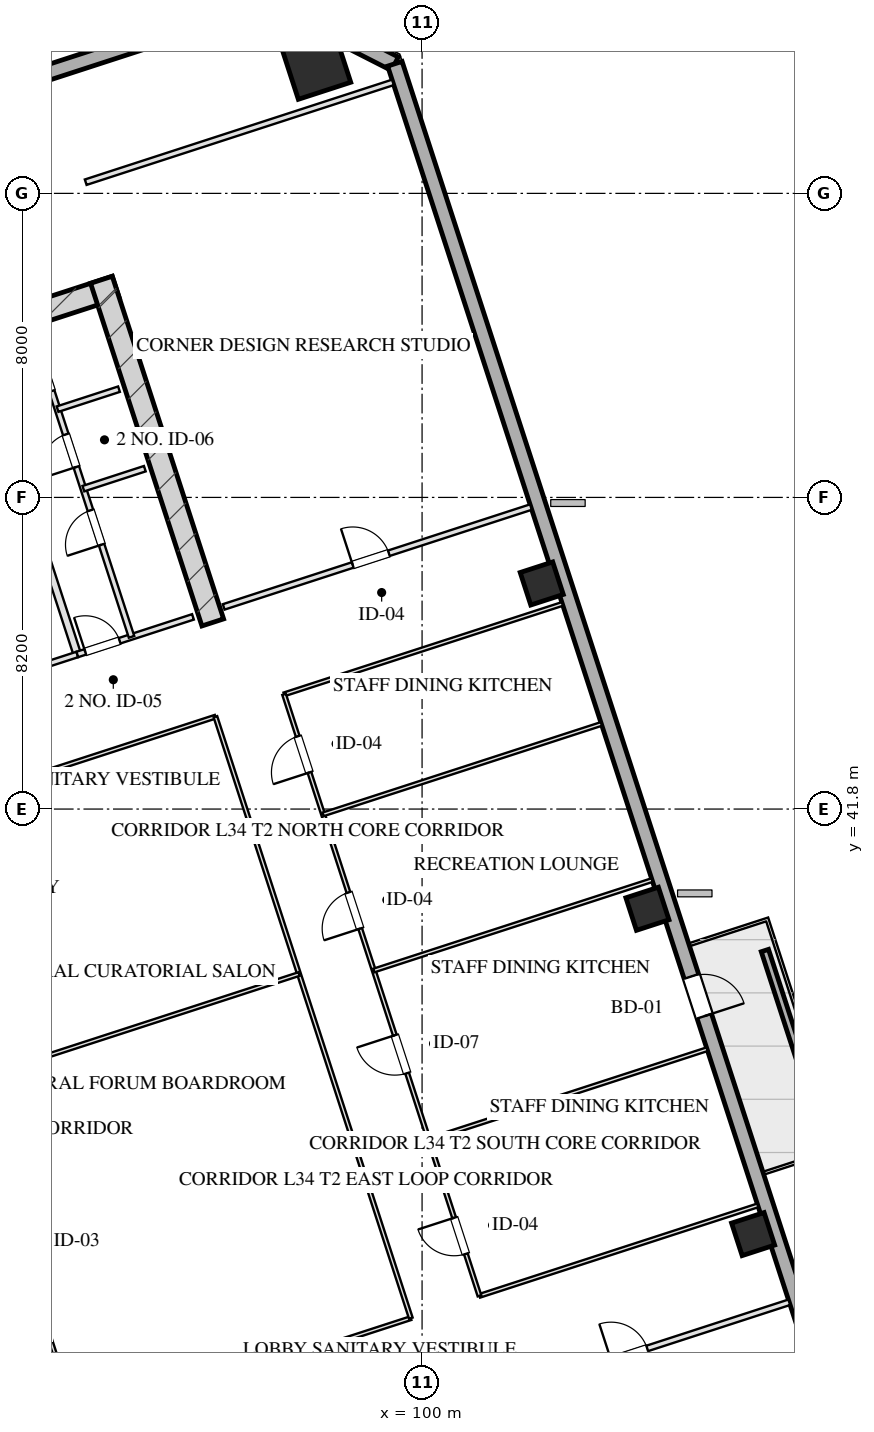
"""IFC4 building model, lengths in metres.
Left out: names, types, materials, properties, quantities, classifications, styles, units other than length and angle.
Written with IfcOpenShell. Run it as: python <this file> out.ifc"""

import sys

from ifc_helpers import new_model, si_unit, direction, frame, frame_2d, origin, origin_2d, place, context, subcontext, project, spatial, rectangle, hollow_rectangle, extrude, element, fill, save


model = new_model("IFC4")
c1 = context("Model", 3, precision=1e-05, world=origin(), true_north=direction((0.0, 1.0)))
c2 = subcontext(c1, "Body", "Model", "MODEL_VIEW")
j1 = project(units=[si_unit("LENGTHUNIT", "METRE"), si_unit("PLANEANGLEUNIT", "RADIAN")], contexts=[c1])
p1 = place(None, origin())
s1 = spatial("IfcSite", under=j1, at=p1, CompositionType="ELEMENT")
p2 = place(p1, origin())
s2 = spatial("IfcBuilding", under=s1, at=p2, CompositionType="ELEMENT")
p3 = place(p2, frame((0.0, 0.0, 131.1)))
s3 = spatial("IfcBuildingStorey", under=s2, at=p3, CompositionType="ELEMENT", Elevation=131.1)
p4 = place(p3, frame((76.344, 50.466, 0.0), z_axis=(0.0, 0.0, 1.0), x_axis=(0.951055727519, 0.309019421968, 0.0)))
e1 = element("IfcWall", 1, at=p4, inside=s3, PredefinedType="SHEAR", context=c2, shape_type="SweptSolid", body=[
    extrude(rectangle(XDim=16.4, YDim=0.6, at=frame_2d((8.2, 0.0))), origin(), (0.0, 0.0, 1.0), 3.45),
])
p5 = place(p3, frame((94.492, 46.71, 0.0), z_axis=(0.0, 0.0, 1.0), x_axis=(-0.309010370028, 0.95105866865, 0.0)))
e2 = element("IfcWall", 2, at=p5, inside=s3, PredefinedType="SHEAR", context=c2, shape_type="SweptSolid", body=[
    extrude(rectangle(XDim=9.48, YDim=0.6, at=frame_2d((4.74, 0.0))), origin(), (0.0, 0.0, 1.0), 3.45),
])
p6 = place(p3, frame((97.209, 61.388, 0.0), z_axis=(0.0, 0.0, 1.0), x_axis=(0.951056516295, 0.309016994375, 0.0)))
e3 = element("IfcColumn", 3, at=p6, inside=s3, PredefinedType="COLUMN", context=c2, shape_type="SweptSolid", body=[
    extrude(hollow_rectangle(XDim=1.45, YDim=1.45, WallThickness=0.05, at=origin_2d()), origin(), (0.0, 0.0, 1.0), 3.451),
])
for number, where, z_axis, x_axis in (
    (4, (108.711, 30.616, 0.0), (0.0, 0.0, 1.0), (0.951, 0.309, 0.0)),
    (5, (105.93, 39.176, 0.0), (0.0, 0.0, 1.0), (0.951, 0.309, 0.0)),
    (6, (103.149, 47.736, 0.0), (0.0, 0.0, 1.0), (0.951, 0.309, 0.0)),
):
    element("IfcColumn", number, at=place(p3, frame(where, z_axis=z_axis, x_axis=x_axis)), inside=s3, PredefinedType="COLUMN", context=c2, shape_type="SweptSolid", body=[
        extrude(hollow_rectangle(XDim=0.9, YDim=0.9, WallThickness=0.032, at=origin_2d()), origin(), (0.0, 0.0, 1.0), 3.451),
    ])
p7 = place(p3, frame((68.047, 53.995, 0.0), z_axis=(0.0, 0.0, 1.0), x_axis=(0.95105505922, 0.309021478754, 0.0)))
e7 = element("IfcWall", 7, at=p7, inside=s3, PredefinedType="SOLIDWALL", context=c2, shape_type="SweptSolid", body=[
    extrude(rectangle(XDim=29.4, YDim=0.4, at=frame_2d((14.7, 0.0))), origin(), (0.0, 0.0, 1.0), 2.61),
])
p8 = place(p3, frame((96.008, 63.08, 0.0), z_axis=(0.0, 0.0, 1.0), x_axis=(0.891001999643, -0.45399937955, 0.0)))
e8 = element("IfcWall", 8, at=p8, inside=s3, PredefinedType="SOLIDWALL", context=c2, shape_type="SweptSolid", body=[
    extrude(rectangle(XDim=3.677, YDim=0.4, at=frame_2d((1.839, 0.0))), origin(), (0.0, 0.0, 1.0), 2.61),
])
p9 = place(p3, frame((99.284, 61.41, 0.0), z_axis=(0.0, 0.0, 1.0), x_axis=(0.309017542002, -0.95105633836, 0.0)))
e9 = element("IfcWall", 9, at=p9, inside=s3, PredefinedType="SOLIDWALL", context=c2, shape_type="SweptSolid", body=[
    extrude(rectangle(XDim=46.4, YDim=0.4, at=frame_2d((23.2, 0.0))), origin(), (0.0, 0.0, 1.0), 2.61),
])
p10 = place(p9, frame((25.25, 0.0, 0.0)))
e10 = element("IfcOpeningElement", 10, at=p10, cuts=e9, PredefinedType="OPENING", context=c2, shape_type="SweptSolid", body=[
    extrude(rectangle(XDim=1.1, YDim=2.15, at=frame_2d((0.55, 1.075))), frame((0.0, 0.21, 0.0), z_axis=(0.0, -1.0, 0.0), x_axis=(1.0, 0.0, 0.0)), (0.0, 0.0, 1.0), 0.42),
])
p11 = place(p3, frame((110.504, 33.512, 0.0), z_axis=(0.0, 0.0, 1.0), x_axis=(-0.308986014439, 0.951066581729, 0.0)))
e11 = element("IfcWall", 11, at=p11, inside=s3, PredefinedType="PARAPET", context=c2, shape_type="SweptSolid", body=[
    extrude(rectangle(XDim=4.8, YDim=0.2, at=frame_2d((2.4, 0.0))), origin(), (0.0, 0.0, 1.0), 0.75),
])
p12 = place(p3, frame((90.928, 45.868, 0.0), z_axis=(0.0, 0.0, 1.0), x_axis=(-0.309042196757, 0.951048327176, 0.0)))
e12 = element("IfcWall", 12, at=p12, inside=s3, PredefinedType="PARTITIONING", context=c2, shape_type="SweptSolid", body=[
    extrude(rectangle(XDim=8.43, YDim=0.2, at=frame_2d((4.215, 0.0))), origin(), (0.0, 0.0, 1.0), 3.175),
])
p13 = place(p3, frame((86.743, 44.508, 0.0), z_axis=(0.0, 0.0, 1.0), x_axis=(0.951063829732, 0.308994485023, 0.0)))
e13 = element("IfcWall", 13, at=p13, inside=s3, PredefinedType="PARTITIONING", context=c2, shape_type="SweptSolid", body=[
    extrude(rectangle(XDim=4.4, YDim=0.15, at=frame_2d((2.2, 0.0))), origin(), (0.0, 0.0, 1.0), 3.175),
])
p14 = place(p13, frame((1.45, 0.0, 0.0)))
e14 = element("IfcOpeningElement", 14, at=p14, cuts=e13, PredefinedType="OPENING", context=c2, shape_type="SweptSolid", body=[
    extrude(rectangle(XDim=1.5, YDim=2.05, at=frame_2d((0.75, 1.025))), frame((0.0, 0.085, 0.0), z_axis=(0.0, -1.0, 0.0), x_axis=(1.0, 0.0, 0.0)), (0.0, 0.0, 1.0), 0.17),
])
p15 = place(p3, frame((90.928, 45.868, 0.0), z_axis=(0.0, 0.0, 1.0), x_axis=(0.951059297078, 0.309008435874, 0.0)))
e15 = element("IfcWall", 15, at=p15, inside=s3, PredefinedType="PARTITIONING", context=c2, shape_type="SweptSolid", body=[
    extrude(rectangle(XDim=3.2, YDim=0.15, at=frame_2d((1.6, 0.0))), origin(), (0.0, 0.0, 1.0), 3.175),
])
p16 = place(p15, frame((0.22, 0.0, 0.0)))
e16 = element("IfcOpeningElement", 16, at=p16, cuts=e15, PredefinedType="OPENING", context=c2, shape_type="SweptSolid", body=[
    extrude(rectangle(XDim=0.95, YDim=2.05, at=frame_2d((0.475, 1.025))), frame((0.0, 0.085, 0.0), z_axis=(0.0, -1.0, 0.0), x_axis=(1.0, 0.0, 0.0)), (0.0, 0.0, 1.0), 0.17),
])
p17 = place(p3, frame((92.355, 46.331, 0.0), z_axis=(0.0, 0.0, 1.0), x_axis=(-0.309007490203, 0.951059604335, 0.0)))
e17 = element("IfcWall", 17, at=p17, inside=s3, PredefinedType="PARTITIONING", context=c2, shape_type="SweptSolid", body=[
    extrude(rectangle(XDim=8.43, YDim=0.15, at=frame_2d((4.215, 0.0))), origin(), (0.0, 0.0, 1.0), 3.175),
])
p18 = place(p17, frame((2.55, 0.0, 0.0)))
e18 = element("IfcOpeningElement", 18, at=p18, cuts=e17, PredefinedType="OPENING", context=c2, shape_type="SweptSolid", body=[
    extrude(rectangle(XDim=0.95, YDim=2.05, at=frame_2d((0.475, 1.025))), frame((0.0, 0.085, 0.0), z_axis=(0.0, -1.0, 0.0), x_axis=(1.0, 0.0, 0.0)), (0.0, 0.0, 1.0), 0.17),
])
p19 = place(p17, frame((4.7, 0.0, 0.0)))
e19 = element("IfcOpeningElement", 19, at=p19, cuts=e17, PredefinedType="OPENING", context=c2, shape_type="SweptSolid", body=[
    extrude(rectangle(XDim=0.9, YDim=2.05, at=frame_2d((0.45, 1.025))), frame((0.0, 0.085, 0.0), z_axis=(0.0, -1.0, 0.0), x_axis=(1.0, 0.0, 0.0)), (0.0, 0.0, 1.0), 0.17),
])
p20 = place(p17, frame((6.8, 0.0, 0.0)))
e20 = element("IfcOpeningElement", 20, at=p20, cuts=e17, PredefinedType="OPENING", context=c2, shape_type="SweptSolid", body=[
    extrude(rectangle(XDim=0.9, YDim=2.05, at=frame_2d((0.45, 1.025))), frame((0.0, 0.085, 0.0), z_axis=(0.0, -1.0, 0.0), x_axis=(1.0, 0.0, 0.0)), (0.0, 0.0, 1.0), 0.17),
])
p21 = place(p3, frame((91.088, 50.23, 0.0), z_axis=(0.0, 0.0, 1.0), x_axis=(0.951054116971, 0.309024378638, 0.0)))
e21 = element("IfcWall", 21, at=p21, inside=s3, PredefinedType="PARTITIONING", context=c2, shape_type="SweptSolid", body=[
    extrude(rectangle(XDim=1.7, YDim=0.15, at=frame_2d((0.85, 0.0))), origin(), (0.0, 0.0, 1.0), 3.175),
])
p22 = place(p3, frame((90.408, 52.323, 0.0), z_axis=(0.0, 0.0, 1.0), x_axis=(0.951040401051, 0.309066587596, 0.0)))
e22 = element("IfcWall", 22, at=p22, inside=s3, PredefinedType="PARTITIONING", context=c2, shape_type="SweptSolid", body=[
    extrude(rectangle(XDim=1.7, YDim=0.15, at=frame_2d((0.85, 0.0))), origin(), (0.0, 0.0, 1.0), 3.175),
])
p23 = place(p3, frame((101.578, 26.196, 0.0), z_axis=(0.0, 0.0, 1.0), x_axis=(0.951062770994, 0.308997743729, 0.0)))
e23 = element("IfcWall", 23, at=p23, inside=s3, PredefinedType="PARTITIONING", context=c2, shape_type="SweptSolid", body=[
    extrude(rectangle(XDim=8.5, YDim=0.15, at=frame_2d((4.25, 0.0))), origin(), (0.0, 0.0, 1.0), 2.15),
])
p24 = place(p23, frame((3.57, 0.0, 0.0)))
e24 = element("IfcOpeningElement", 24, at=p24, cuts=e23, PredefinedType="OPENING", context=c2, shape_type="SweptSolid", body=[
    extrude(rectangle(XDim=1.0, YDim=2.05, at=frame_2d((0.5, 1.025))), frame((0.0, 0.085, 0.0), z_axis=(0.0, -1.0, 0.0), x_axis=(1.0, 0.0, 0.0)), (0.0, 0.0, 1.0), 0.17),
])
p25 = place(p3, frame((91.149, 58.294, 0.0), z_axis=(0.0, 0.0, 1.0), x_axis=(0.951062770994, 0.308997743729, 0.0)))
e25 = element("IfcWall", 25, at=p25, inside=s3, PredefinedType="PARTITIONING", context=c2, shape_type="SweptSolid", body=[
    extrude(rectangle(XDim=8.5, YDim=0.15, at=frame_2d((4.25, 0.0))), origin(), (0.0, 0.0, 1.0), 3.175),
])
p26 = place(p3, frame((94.78, 47.119, 0.0), z_axis=(0.0, 0.0, 1.0), x_axis=(0.951054329824, 0.309023723562, 0.0)))
e26 = element("IfcWall", 26, at=p26, inside=s3, PredefinedType="PARTITIONING", context=c2, shape_type="SweptSolid", body=[
    extrude(rectangle(XDim=8.5, YDim=0.15, at=frame_2d((4.25, 0.0))), origin(), (0.0, 0.0, 1.0), 2.15),
])
p27 = place(p26, frame((3.57, 0.0, 0.0)))
e27 = element("IfcOpeningElement", 27, at=p27, cuts=e26, PredefinedType="OPENING", context=c2, shape_type="SweptSolid", body=[
    extrude(rectangle(XDim=1.0, YDim=2.05, at=frame_2d((0.5, 1.025))), frame((0.0, 0.085, 0.0), z_axis=(0.0, -1.0, 0.0), x_axis=(1.0, 0.0, 0.0)), (0.0, 0.0, 1.0), 0.17),
])
p28 = place(p3, frame((90.954, 25.562, 0.0), z_axis=(0.0, 0.0, 1.0), x_axis=(0.951052398814, 0.309029666393, 0.0)))
e28 = element("IfcWall", 28, at=p28, inside=s3, PredefinedType="MOVABLE", context=c2, shape_type="SweptSolid", body=[
    extrude(rectangle(XDim=9.2, YDim=0.1, at=frame_2d((4.6, 0.0))), origin(), (0.0, 0.0, 1.0), 3.175),
])
p29 = place(p3, frame((101.511, 28.992, 0.0), z_axis=(0.0, 0.0, 1.0), x_axis=(0.951056202154, 0.3090179612, 0.0)))
e29 = element("IfcWall", 29, at=p29, inside=s3, PredefinedType="MOVABLE", context=c2, shape_type="SweptSolid", body=[
    extrude(rectangle(XDim=7.7, YDim=0.1, at=frame_2d((3.85, 0.0))), origin(), (0.0, 0.0, 1.0), 3.175),
])
p30 = place(p3, frame((85.812, 41.387, 0.0), z_axis=(0.0, 0.0, 1.0), x_axis=(0.951054933035, 0.309021867106, 0.0)))
e30 = element("IfcWall", 30, at=p30, inside=s3, PredefinedType="MOVABLE", context=c2, shape_type="SweptSolid", body=[
    extrude(rectangle(XDim=9.2, YDim=0.1, at=frame_2d((4.6, 0.0))), origin(), (0.0, 0.0, 1.0), 3.175),
])
p31 = place(p3, frame((96.369, 44.818, 0.0), z_axis=(0.0, 0.0, 1.0), x_axis=(0.9510592298, 0.30900864294, 0.0)))
e31 = element("IfcWall", 31, at=p31, inside=s3, PredefinedType="MOVABLE", context=c2, shape_type="SweptSolid", body=[
    extrude(rectangle(XDim=7.7, YDim=0.1, at=frame_2d((3.85, 0.0))), origin(), (0.0, 0.0, 1.0), 3.175),
])
p32 = place(p3, frame((90.954, 25.562, 0.0), z_axis=(0.0, 0.0, 1.0), x_axis=(-0.30901773025, 0.951056277195, 0.0)))
e32 = element("IfcWall", 32, at=p32, inside=s3, PredefinedType="MOVABLE", context=c2, shape_type="SweptSolid", body=[
    extrude(rectangle(XDim=16.64, YDim=0.1, at=frame_2d((8.32, 0.0))), origin(), (0.0, 0.0, 1.0), 3.175),
])
p33 = place(p32, frame((4.284, 0.0, 0.0)))
e33 = element("IfcOpeningElement", 33, at=p33, cuts=e32, PredefinedType="OPENING", context=c2, shape_type="SweptSolid", body=[
    extrude(rectangle(XDim=1.1, YDim=2.05, at=frame_2d((0.55, 1.025))), frame((0.0, 0.06, 0.0), z_axis=(0.0, -1.0, 0.0), x_axis=(1.0, 0.0, 0.0)), (0.0, 0.0, 1.0), 0.12),
])
p34 = place(p32, frame((12.724, 0.0, 0.0)))
e34 = element("IfcOpeningElement", 34, at=p34, cuts=e32, PredefinedType="OPENING", context=c2, shape_type="SweptSolid", body=[
    extrude(rectangle(XDim=1.1, YDim=2.05, at=frame_2d((0.55, 1.025))), frame((0.0, 0.06, 0.0), z_axis=(0.0, -1.0, 0.0), x_axis=(1.0, 0.0, 0.0)), (0.0, 0.0, 1.0), 0.12),
])
p35 = place(p3, frame((99.704, 28.405, 0.0), z_axis=(0.0, 0.0, 1.0), x_axis=(-0.309004459387, 0.951060589068, 0.0)))
e35 = element("IfcWall", 35, at=p35, inside=s3, PredefinedType="MOVABLE", context=c2, shape_type="SweptSolid", body=[
    extrude(rectangle(XDim=16.64, YDim=0.1, at=frame_2d((8.32, 0.0))), origin(), (0.0, 0.0, 1.0), 3.175),
])
p36 = place(p3, frame((101.511, 28.992, 0.0), z_axis=(0.0, 0.0, 1.0), x_axis=(-0.30901773025, 0.951056277195, 0.0)))
e36 = element("IfcWall", 36, at=p36, inside=s3, PredefinedType="MOVABLE", context=c2, shape_type="SweptSolid", body=[
    extrude(rectangle(XDim=16.64, YDim=0.1, at=frame_2d((8.32, 0.0))), origin(), (0.0, 0.0, 1.0), 3.175),
])
p37 = place(p36, frame((1.16, 0.0, 0.0)))
e37 = element("IfcOpeningElement", 37, at=p37, cuts=e36, PredefinedType="OPENING", context=c2, shape_type="SweptSolid", body=[
    extrude(rectangle(XDim=1.0, YDim=2.05, at=frame_2d((0.5, 1.025))), frame((0.0, 0.06, 0.0), z_axis=(0.0, -1.0, 0.0), x_axis=(1.0, 0.0, 0.0)), (0.0, 0.0, 1.0), 0.12),
])
p38 = place(p36, frame((6.16, 0.0, 0.0)))
e38 = element("IfcOpeningElement", 38, at=p38, cuts=e36, PredefinedType="OPENING", context=c2, shape_type="SweptSolid", body=[
    extrude(rectangle(XDim=1.05, YDim=2.05, at=frame_2d((0.525, 1.025))), frame((0.0, 0.06, 0.0), z_axis=(0.0, -1.0, 0.0), x_axis=(1.0, 0.0, 0.0)), (0.0, 0.0, 1.0), 0.12),
])
p39 = place(p36, frame((10.16, 0.0, 0.0)))
e39 = element("IfcOpeningElement", 39, at=p39, cuts=e36, PredefinedType="OPENING", context=c2, shape_type="SweptSolid", body=[
    extrude(rectangle(XDim=1.0, YDim=2.05, at=frame_2d((0.5, 1.025))), frame((0.0, 0.06, 0.0), z_axis=(0.0, -1.0, 0.0), x_axis=(1.0, 0.0, 0.0)), (0.0, 0.0, 1.0), 0.12),
])
p40 = place(p36, frame((14.48, 0.0, 0.0)))
e40 = element("IfcOpeningElement", 40, at=p40, cuts=e36, PredefinedType="OPENING", context=c2, shape_type="SweptSolid", body=[
    extrude(rectangle(XDim=1.0, YDim=2.05, at=frame_2d((0.5, 1.025))), frame((0.0, 0.06, 0.0), z_axis=(0.0, -1.0, 0.0), x_axis=(1.0, 0.0, 0.0)), (0.0, 0.0, 1.0), 0.12),
])
p41 = place(p3, frame((88.012, 34.616, 0.0), z_axis=(0.0, 0.0, 1.0), x_axis=(0.951054933035, 0.309021867106, 0.0)))
e41 = element("IfcWall", 41, at=p41, inside=s3, PredefinedType="MOVABLE", context=c2, shape_type="SweptSolid", body=[
    extrude(rectangle(XDim=9.2, YDim=0.1, at=frame_2d((4.6, 0.0))), origin(), (0.0, 0.0, 1.0), 3.175),
])
p42 = place(p3, frame((100.176, 33.101, 0.0), z_axis=(0.0, 0.0, 1.0), x_axis=(0.951056202154, 0.3090179612, 0.0)))
e42 = element("IfcWall", 42, at=p42, inside=s3, PredefinedType="MOVABLE", context=c2, shape_type="SweptSolid", body=[
    extrude(rectangle(XDim=7.7, YDim=0.1, at=frame_2d((3.85, 0.0))), origin(), (0.0, 0.0, 1.0), 3.175),
])
for number, where, z_axis, x_axis in (
    (43, (98.73, 37.552, 0.0), (0.0, 0.0, 1.0), (0.951, 0.309, 0.0)),
    (44, (97.395, 41.66, 0.0), (0.0, 0.0, 1.0), (0.951, 0.309, 0.0)),
):
    element("IfcWall", number, at=place(p3, frame(where, z_axis=z_axis, x_axis=x_axis)), inside=s3, PredefinedType="MOVABLE", context=c2, shape_type="SweptSolid", body=[
        extrude(rectangle(XDim=7.7, YDim=0.1, at=frame_2d((3.85, 0.0))), origin(), (0.0, 0.0, 1.0), 3.175),
    ])
p43 = place(p10, origin())
e45 = element("IfcDoor", 45, at=p43, inside=s3, OperationType="SINGLE_SWING_RIGHT", PredefinedType="DOOR", context=c2, shape_type="SweptSolid", body=[
    extrude(rectangle(XDim=1.1, YDim=2.15, at=frame_2d((0.55, 1.075))), frame((0.0, 0.025, 0.0), z_axis=(0.0, -1.0, 0.0), x_axis=(1.0, 0.0, 0.0)), (0.0, 0.0, 1.0), 0.05),
])
fill(e10, e45)
p44 = place(p16, origin())
e46 = element("IfcDoor", 46, at=p44, inside=s3, OperationType="SINGLE_SWING_LEFT", PredefinedType="DOOR", context=c2, shape_type="SweptSolid", body=[
    extrude(rectangle(XDim=0.95, YDim=2.05, at=frame_2d((0.475, 1.025))), frame((0.0, 0.025, 0.0), z_axis=(0.0, -1.0, 0.0), x_axis=(1.0, 0.0, 0.0)), (0.0, 0.0, 1.0), 0.05),
])
fill(e16, e46)
p45 = place(p18, origin())
e47 = element("IfcDoor", 47, at=p45, inside=s3, OperationType="SINGLE_SWING_LEFT", PredefinedType="DOOR", context=c2, shape_type="SweptSolid", body=[
    extrude(rectangle(XDim=0.95, YDim=2.05, at=frame_2d((0.475, 1.025))), frame((0.0, 0.025, 0.0), z_axis=(0.0, -1.0, 0.0), x_axis=(1.0, 0.0, 0.0)), (0.0, 0.0, 1.0), 0.05),
])
fill(e18, e47)
p46 = place(p19, origin())
e48 = element("IfcDoor", 48, at=p46, inside=s3, OperationType="SINGLE_SWING_LEFT", PredefinedType="DOOR", context=c2, shape_type="SweptSolid", body=[
    extrude(rectangle(XDim=0.9, YDim=2.05, at=frame_2d((0.45, 1.025))), frame((0.0, 0.025, 0.0), z_axis=(0.0, -1.0, 0.0), x_axis=(1.0, 0.0, 0.0)), (0.0, 0.0, 1.0), 0.05),
])
fill(e19, e48)
p47 = place(p20, origin())
e49 = element("IfcDoor", 49, at=p47, inside=s3, OperationType="SINGLE_SWING_RIGHT", PredefinedType="DOOR", context=c2, shape_type="SweptSolid", body=[
    extrude(rectangle(XDim=0.9, YDim=2.05, at=frame_2d((0.45, 1.025))), frame((0.0, 0.025, 0.0), z_axis=(0.0, -1.0, 0.0), x_axis=(1.0, 0.0, 0.0)), (0.0, 0.0, 1.0), 0.05),
])
fill(e20, e49)
p48 = place(p24, origin())
e50 = element("IfcDoor", 50, at=p48, inside=s3, OperationType="SINGLE_SWING_LEFT", PredefinedType="DOOR", context=c2, shape_type="SweptSolid", body=[
    extrude(rectangle(XDim=1.0, YDim=2.05, at=frame_2d((0.5, 1.025))), frame((0.0, 0.025, 0.0), z_axis=(0.0, -1.0, 0.0), x_axis=(1.0, 0.0, 0.0)), (0.0, 0.0, 1.0), 0.05),
])
fill(e24, e50)
p49 = place(p27, origin())
e51 = element("IfcDoor", 51, at=p49, inside=s3, OperationType="SINGLE_SWING_LEFT", PredefinedType="DOOR", context=c2, shape_type="SweptSolid", body=[
    extrude(rectangle(XDim=1.0, YDim=2.05, at=frame_2d((0.5, 1.025))), frame((0.0, 0.025, 0.0), z_axis=(0.0, -1.0, 0.0), x_axis=(1.0, 0.0, 0.0)), (0.0, 0.0, 1.0), 0.05),
])
fill(e27, e51)
p50 = place(p37, origin())
e52 = element("IfcDoor", 52, at=p50, inside=s3, OperationType="SINGLE_SWING_RIGHT", PredefinedType="DOOR", context=c2, shape_type="SweptSolid", body=[
    extrude(rectangle(XDim=1.0, YDim=2.05, at=frame_2d((0.5, 1.025))), frame((0.0, 0.025, 0.0), z_axis=(0.0, -1.0, 0.0), x_axis=(1.0, 0.0, 0.0)), (0.0, 0.0, 1.0), 0.05),
])
fill(e37, e52)
p51 = place(p38, origin())
e53 = element("IfcDoor", 53, at=p51, inside=s3, OperationType="SINGLE_SWING_RIGHT", PredefinedType="DOOR", context=c2, shape_type="SweptSolid", body=[
    extrude(rectangle(XDim=1.05, YDim=2.05, at=frame_2d((0.525, 1.025))), frame((0.0, 0.025, 0.0), z_axis=(0.0, -1.0, 0.0), x_axis=(1.0, 0.0, 0.0)), (0.0, 0.0, 1.0), 0.05),
])
fill(e38, e53)
p52 = place(p39, origin())
e54 = element("IfcDoor", 54, at=p52, inside=s3, OperationType="SINGLE_SWING_LEFT", PredefinedType="DOOR", context=c2, shape_type="SweptSolid", body=[
    extrude(rectangle(XDim=1.0, YDim=2.05, at=frame_2d((0.5, 1.025))), frame((0.0, 0.025, 0.0), z_axis=(0.0, -1.0, 0.0), x_axis=(1.0, 0.0, 0.0)), (0.0, 0.0, 1.0), 0.05),
])
fill(e39, e54)
p53 = place(p40, origin())
e55 = element("IfcDoor", 55, at=p53, inside=s3, OperationType="SINGLE_SWING_LEFT", PredefinedType="DOOR", context=c2, shape_type="SweptSolid", body=[
    extrude(rectangle(XDim=1.0, YDim=2.05, at=frame_2d((0.5, 1.025))), frame((0.0, 0.025, 0.0), z_axis=(0.0, -1.0, 0.0), x_axis=(1.0, 0.0, 0.0)), (0.0, 0.0, 1.0), 0.05),
])
fill(e40, e55)
save(model, sys.argv[1])
